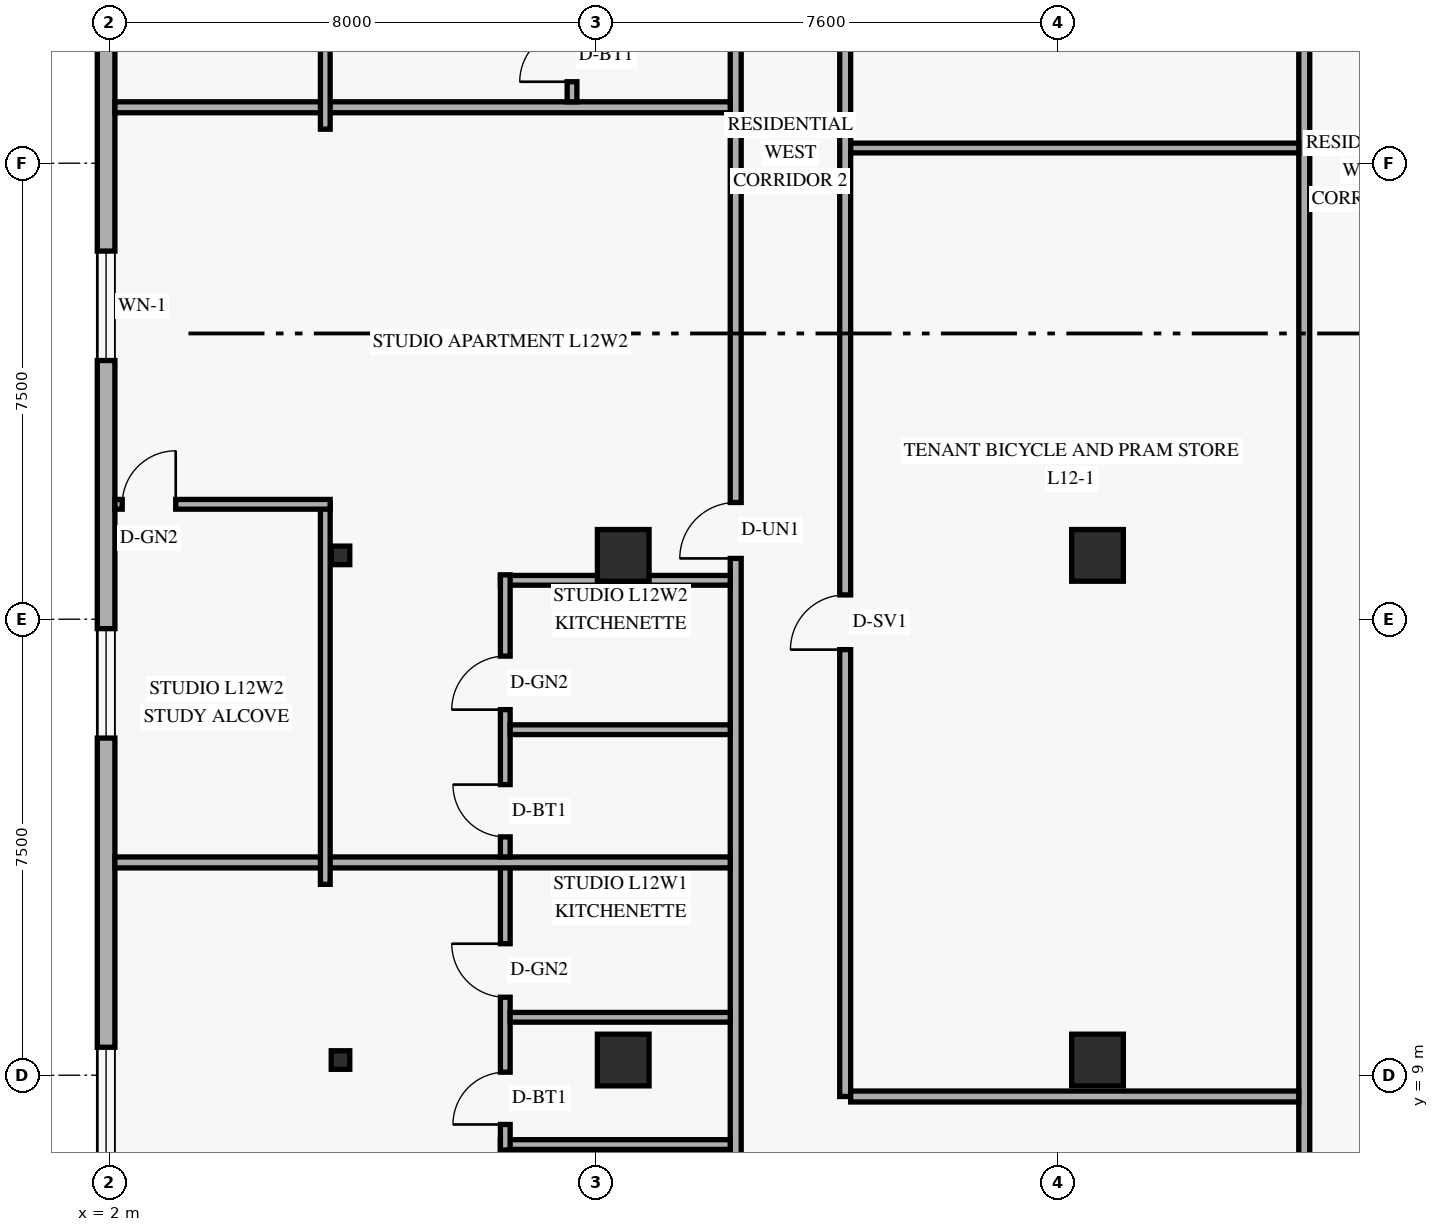
"""IFC4 building model, lengths in metres.
Left out: names, types, materials, properties, quantities, classifications, styles, units other than length and angle.
Written with IfcOpenShell. Run it as: python <this file> out.ifc"""

import sys

from ifc_helpers import new_model, si_unit, direction, frame, frame_2d, origin, origin_2d, place, context, subcontext, project, spatial, rectangle, hollow_rectangle, extrude, element, fill, save


model = new_model("IFC4")
c1 = context("Model", 3, precision=1e-05, world=origin(), true_north=direction((0.0, 1.0)))
c2 = subcontext(c1, "Body", "Model", "MODEL_VIEW")
j1 = project(units=[si_unit("LENGTHUNIT", "METRE"), si_unit("PLANEANGLEUNIT", "RADIAN")], contexts=[c1])
p1 = place(None, origin())
s1 = spatial("IfcSite", under=j1, at=p1, CompositionType="ELEMENT")
p2 = place(p1, origin())
s2 = spatial("IfcBuilding", under=s1, at=p2, CompositionType="ELEMENT")
p3 = place(p2, frame((0.0, 0.0, 49.2)))
s3 = spatial("IfcBuildingStorey", under=s2, at=p3, CompositionType="ELEMENT", Elevation=49.2)
for number, where, z_axis, x_axis in (
    (1, (5.8, 9.25, 0.0), (0.0, 0.0, 1.0), (1.0, 0.0, 0.0)),
    (2, (5.8, 17.55, 0.0), (0.0, 0.0, 1.0), (1.0, 0.0, 0.0)),
):
    element("IfcColumn", number, at=place(p3, frame(where, z_axis=z_axis, x_axis=x_axis)), inside=s3, PredefinedType="COLUMN", context=c2, shape_type="SweptSolid", body=[
        extrude(hollow_rectangle(XDim=0.305, YDim=0.305, WallThickness=0.013, at=origin_2d()), origin(), (0.0, 0.0, 1.0), 3.6),
    ])
for number, where, z_axis, x_axis in (
    (3, (10.45, 9.25, 0.0), (0.0, 0.0, 1.0), (1.0, 0.0, 0.0)),
    (4, (10.45, 17.55, 0.0), (0.0, 0.0, 1.0), (1.0, 0.0, 0.0)),
    (5, (18.25, 9.25, 0.0), (0.0, 0.0, 1.0), (1.0, 0.0, 0.0)),
    (6, (18.25, 17.55, 0.0), (0.0, 0.0, 1.0), (1.0, 0.0, 0.0)),
):
    element("IfcColumn", number, at=place(p3, frame(where, z_axis=z_axis, x_axis=x_axis)), inside=s3, PredefinedType="COLUMN", context=c2, shape_type="SweptSolid", body=[
        extrude(rectangle(XDim=0.85, YDim=0.85, at=origin_2d()), origin(), (0.0, 0.0, 1.0), 3.6),
    ])
p4 = place(p3, frame((1.945, 43.38, 0.0), z_axis=(0.0, 0.0, 1.0), x_axis=(0.0, -1.0, 0.0)))
e7 = element("IfcWall", 7, at=p4, inside=s3, PredefinedType="SOLIDWALL", context=c2, shape_type="SweptSolid", body=[
    extrude(rectangle(XDim=38.76, YDim=0.29, at=frame_2d((19.38, 0.0))), origin(), (0.0, 0.0, 1.0), 3.36),
])
p5 = place(p4, frame((33.92, 0.0, 0.85)))
e8 = element("IfcOpeningElement", 8, at=p5, cuts=e7, PredefinedType="OPENING", context=c2, shape_type="SweptSolid", body=[
    extrude(rectangle(XDim=1.8, YDim=1.6, at=frame_2d((0.9, 0.8))), frame((0.0, 0.155, 0.0), z_axis=(0.0, -1.0, 0.0), x_axis=(1.0, 0.0, 0.0)), (0.0, 0.0, 1.0), 0.31),
])
p6 = place(p4, frame((27.035, 0.0, 0.85)))
e9 = element("IfcOpeningElement", 9, at=p6, cuts=e7, PredefinedType="OPENING", context=c2, shape_type="SweptSolid", body=[
    extrude(rectangle(XDim=1.8, YDim=1.6, at=frame_2d((0.9, 0.8))), frame((0.0, 0.155, 0.0), z_axis=(0.0, -1.0, 0.0), x_axis=(1.0, 0.0, 0.0)), (0.0, 0.0, 1.0), 0.31),
])
p7 = place(p4, frame((20.825, 0.0, 0.85)))
e10 = element("IfcOpeningElement", 10, at=p7, cuts=e7, PredefinedType="OPENING", context=c2, shape_type="SweptSolid", body=[
    extrude(rectangle(XDim=1.8, YDim=1.6, at=frame_2d((0.9, 0.8))), frame((0.0, 0.155, 0.0), z_axis=(0.0, -1.0, 0.0), x_axis=(1.0, 0.0, 0.0)), (0.0, 0.0, 1.0), 0.31),
])
p8 = place(p4, frame((14.615, 0.0, 0.85)))
e11 = element("IfcOpeningElement", 11, at=p8, cuts=e7, PredefinedType="OPENING", context=c2, shape_type="SweptSolid", body=[
    extrude(rectangle(XDim=1.8, YDim=1.6, at=frame_2d((0.9, 0.8))), frame((0.0, 0.155, 0.0), z_axis=(0.0, -1.0, 0.0), x_axis=(1.0, 0.0, 0.0)), (0.0, 0.0, 1.0), 0.31),
])
p9 = place(p4, frame((8.635, 0.0, 0.85)))
e12 = element("IfcOpeningElement", 12, at=p9, cuts=e7, PredefinedType="OPENING", context=c2, shape_type="SweptSolid", body=[
    extrude(rectangle(XDim=1.8, YDim=1.6, at=frame_2d((0.9, 0.8))), frame((0.0, 0.155, 0.0), z_axis=(0.0, -1.0, 0.0), x_axis=(1.0, 0.0, 0.0)), (0.0, 0.0, 1.0), 0.31),
])
p10 = place(p4, frame((2.655, 0.0, 0.85)))
e13 = element("IfcOpeningElement", 13, at=p10, cuts=e7, PredefinedType="OPENING", context=c2, shape_type="SweptSolid", body=[
    extrude(rectangle(XDim=1.8, YDim=1.6, at=frame_2d((0.9, 0.8))), frame((0.0, 0.155, 0.0), z_axis=(0.0, -1.0, 0.0), x_axis=(1.0, 0.0, 0.0)), (0.0, 0.0, 1.0), 0.31),
])
p11 = place(p3, frame((21.65, 6.8, 0.0), z_axis=(0.0, 0.0, 1.0), x_axis=(0.0, 1.0, 0.0)))
e14 = element("IfcWall", 14, at=p11, inside=s3, PredefinedType="STANDARD", context=c2, shape_type="SweptSolid", body=[
    extrude(rectangle(XDim=34.4, YDim=0.18, at=frame_2d((17.2, 0.0))), origin(), (0.0, 0.0, 1.0), 2.649),
])
p12 = place(p3, frame((12.3, 1.29, 0.0), z_axis=(0.0, 0.0, 1.0), x_axis=(0.0, 1.0, 0.0)))
e15 = element("IfcWall", 15, at=p12, inside=s3, PredefinedType="STANDARD", context=c2, shape_type="SweptSolid", body=[
    extrude(rectangle(XDim=45.42, YDim=0.18, at=frame_2d((22.71, 0.0))), origin(), (0.0, 0.0, 1.0), 2.649),
])
p13 = place(p12, frame((5.27, 0.0, 0.0)))
e16 = element("IfcOpeningElement", 16, at=p13, cuts=e15, PredefinedType="OPENING", context=c2, shape_type="SweptSolid", body=[
    extrude(rectangle(XDim=0.92, YDim=2.15, at=frame_2d((0.46, 1.075))), frame((0.0, 0.1, 0.0), z_axis=(0.0, -1.0, 0.0), x_axis=(1.0, 0.0, 0.0)), (0.0, 0.0, 1.0), 0.2),
])
p14 = place(p12, frame((16.21, 0.0, 0.0)))
e17 = element("IfcOpeningElement", 17, at=p14, cuts=e15, PredefinedType="OPENING", context=c2, shape_type="SweptSolid", body=[
    extrude(rectangle(XDim=0.92, YDim=2.15, at=frame_2d((0.46, 1.075))), frame((0.0, 0.1, 0.0), z_axis=(0.0, -1.0, 0.0), x_axis=(1.0, 0.0, 0.0)), (0.0, 0.0, 1.0), 0.2),
])
p15 = place(p12, frame((28.63, 0.0, 0.0)))
e18 = element("IfcOpeningElement", 18, at=p15, cuts=e15, PredefinedType="OPENING", context=c2, shape_type="SweptSolid", body=[
    extrude(rectangle(XDim=0.92, YDim=2.15, at=frame_2d((0.46, 1.075))), frame((0.0, 0.1, 0.0), z_axis=(0.0, -1.0, 0.0), x_axis=(1.0, 0.0, 0.0)), (0.0, 0.0, 1.0), 0.2),
])
p16 = place(p12, frame((40.59, 0.0, 0.0)))
e19 = element("IfcOpeningElement", 19, at=p16, cuts=e15, PredefinedType="OPENING", context=c2, shape_type="SweptSolid", body=[
    extrude(rectangle(XDim=0.92, YDim=2.15, at=frame_2d((0.46, 1.075))), frame((0.0, 0.1, 0.0), z_axis=(0.0, -1.0, 0.0), x_axis=(1.0, 0.0, 0.0)), (0.0, 0.0, 1.0), 0.2),
])
p17 = place(p3, frame((14.1, 8.65, 0.0), z_axis=(0.0, 0.0, 1.0), x_axis=(0.0, 1.0, 0.0)))
e20 = element("IfcWall", 20, at=p17, inside=s3, PredefinedType="STANDARD", context=c2, shape_type="SweptSolid", body=[
    extrude(rectangle(XDim=30.7, YDim=0.18, at=frame_2d((15.35, 0.0))), origin(), (0.0, 0.0, 1.0), 2.649),
])
p18 = place(p17, frame((7.35, 0.0, 0.0)))
e21 = element("IfcOpeningElement", 21, at=p18, cuts=e20, PredefinedType="OPENING", context=c2, shape_type="SweptSolid", body=[
    extrude(rectangle(XDim=0.9, YDim=2.1, at=frame_2d((0.45, 1.05))), frame((0.0, 0.1, 0.0), z_axis=(0.0, -1.0, 0.0), x_axis=(1.0, 0.0, 0.0)), (0.0, 0.0, 1.0), 0.2),
])
p19 = place(p17, frame((22.7, 0.0, 0.0)))
e22 = element("IfcOpeningElement", 22, at=p19, cuts=e20, PredefinedType="OPENING", context=c2, shape_type="SweptSolid", body=[
    extrude(rectangle(XDim=0.95, YDim=2.15, at=frame_2d((0.475, 1.075))), frame((0.0, 0.1, 0.0), z_axis=(0.0, -1.0, 0.0), x_axis=(1.0, 0.0, 0.0)), (0.0, 0.0, 1.0), 0.2),
])
p20 = place(p3, frame((14.19, 8.65, 0.0), z_axis=(0.0, 0.0, 1.0), x_axis=(1.0, 0.0, 0.0)))
e23 = element("IfcWall", 23, at=p20, inside=s3, PredefinedType="STANDARD", context=c2, shape_type="SweptSolid", body=[
    extrude(rectangle(XDim=7.37, YDim=0.18, at=frame_2d((3.685, 0.0))), origin(), (0.0, 0.0, 1.0), 2.649),
])
p21 = place(p3, frame((8.43, 7.86, 0.0), z_axis=(0.0, 0.0, 1.0), x_axis=(1.0, 0.0, 0.0)))
e24 = element("IfcWall", 24, at=p21, inside=s3, PredefinedType="PLUMBINGWALL", context=c2, shape_type="SweptSolid", body=[
    extrude(rectangle(XDim=3.78, YDim=0.16, at=frame_2d((1.89, 0.0))), origin(), (0.0, 0.0, 1.0), 2.649),
])
p22 = place(p3, frame((8.51, 7.77, 0.0), z_axis=(0.0, 0.0, 1.0), x_axis=(0.0, 1.0, 0.0)))
e25 = element("IfcWall", 25, at=p22, inside=s3, PredefinedType="PLUMBINGWALL", context=c2, shape_type="SweptSolid", body=[
    extrude(rectangle(XDim=4.73, YDim=0.16, at=frame_2d((2.365, 0.0))), origin(), (0.0, 0.0, 1.0), 2.649),
])
p23 = place(p22, frame((0.42, 0.0, 0.0)))
e26 = element("IfcOpeningElement", 26, at=p23, cuts=e25, PredefinedType="OPENING", context=c2, shape_type="SweptSolid", body=[
    extrude(rectangle(XDim=0.86, YDim=2.12, at=frame_2d((0.43, 1.06))), frame((0.0, 0.09, 0.0), z_axis=(0.0, -1.0, 0.0), x_axis=(1.0, 0.0, 0.0)), (0.0, 0.0, 1.0), 0.18),
])
p24 = place(p22, frame((2.513, 0.0, 0.0)))
e27 = element("IfcOpeningElement", 27, at=p24, cuts=e25, PredefinedType="OPENING", context=c2, shape_type="SweptSolid", body=[
    extrude(rectangle(XDim=0.88, YDim=2.12, at=frame_2d((0.44, 1.06))), frame((0.0, 0.09, 0.0), z_axis=(0.0, -1.0, 0.0), x_axis=(1.0, 0.0, 0.0)), (0.0, 0.0, 1.0), 0.18),
])
p25 = place(p3, frame((8.59, 9.953, 0.0), z_axis=(0.0, 0.0, 1.0), x_axis=(1.0, 0.0, 0.0)))
e28 = element("IfcWall", 28, at=p25, inside=s3, PredefinedType="PLUMBINGWALL", context=c2, shape_type="SweptSolid", body=[
    extrude(rectangle(XDim=3.62, YDim=0.16, at=frame_2d((1.81, 0.0))), origin(), (0.0, 0.0, 1.0), 2.649),
])
p26 = place(p3, frame((2.09, 12.5, 0.0), z_axis=(0.0, 0.0, 1.0), x_axis=(1.0, 0.0, 0.0)))
e29 = element("IfcWall", 29, at=p26, inside=s3, PredefinedType="PARTITIONING", context=c2, shape_type="SweptSolid", body=[
    extrude(rectangle(XDim=10.12, YDim=0.18, at=frame_2d((5.06, 0.0))), origin(), (0.0, 0.0, 1.0), 2.649),
])
p27 = place(p3, frame((8.43, 17.14, 0.0), z_axis=(0.0, 0.0, 1.0), x_axis=(1.0, 0.0, 0.0)))
e30 = element("IfcWall", 30, at=p27, inside=s3, PredefinedType="PLUMBINGWALL", context=c2, shape_type="SweptSolid", body=[
    extrude(rectangle(XDim=3.78, YDim=0.16, at=frame_2d((1.89, 0.0))), origin(), (0.0, 0.0, 1.0), 2.649),
])
p28 = place(p3, frame((8.51, 12.59, 0.0), z_axis=(0.0, 0.0, 1.0), x_axis=(0.0, 1.0, 0.0)))
e31 = element("IfcWall", 31, at=p28, inside=s3, PredefinedType="PLUMBINGWALL", context=c2, shape_type="SweptSolid", body=[
    extrude(rectangle(XDim=4.64, YDim=0.16, at=frame_2d((2.32, 0.0))), origin(), (0.0, 0.0, 1.0), 2.932),
])
p29 = place(p28, frame((0.33, 0.0, 0.0)))
e32 = element("IfcOpeningElement", 32, at=p29, cuts=e31, PredefinedType="OPENING", context=c2, shape_type="SweptSolid", body=[
    extrude(rectangle(XDim=0.86, YDim=2.12, at=frame_2d((0.43, 1.06))), frame((0.0, 0.09, 0.0), z_axis=(0.0, -1.0, 0.0), x_axis=(1.0, 0.0, 0.0)), (0.0, 0.0, 1.0), 0.18),
])
p30 = place(p28, frame((2.423, 0.0, 0.0)))
e33 = element("IfcOpeningElement", 33, at=p30, cuts=e31, PredefinedType="OPENING", context=c2, shape_type="SweptSolid", body=[
    extrude(rectangle(XDim=0.88, YDim=2.12, at=frame_2d((0.44, 1.06))), frame((0.0, 0.09, 0.0), z_axis=(0.0, -1.0, 0.0), x_axis=(1.0, 0.0, 0.0)), (0.0, 0.0, 1.0), 0.18),
])
p31 = place(p3, frame((8.59, 14.683, 0.0), z_axis=(0.0, 0.0, 1.0), x_axis=(1.0, 0.0, 0.0)))
e34 = element("IfcWall", 34, at=p31, inside=s3, PredefinedType="PLUMBINGWALL", context=c2, shape_type="SweptSolid", body=[
    extrude(rectangle(XDim=3.62, YDim=0.16, at=frame_2d((1.81, 0.0))), origin(), (0.0, 0.0, 1.0), 2.649),
])
p32 = place(p3, frame((5.55, 12.14, 0.0), z_axis=(0.0, 0.0, 1.0), x_axis=(0.0, 1.0, 0.0)))
e35 = element("IfcWall", 35, at=p32, inside=s3, PredefinedType="PARTITIONING", context=c2, shape_type="SweptSolid", body=[
    extrude(rectangle(XDim=6.25, YDim=0.16, at=frame_2d((3.125, 0.0))), origin(), (0.0, 0.0, 1.0), 3.36),
])
p33 = place(p3, frame((2.09, 18.39, 0.0), z_axis=(0.0, 0.0, 1.0), x_axis=(1.0, 0.0, 0.0)))
e36 = element("IfcWall", 36, at=p33, inside=s3, PredefinedType="PARTITIONING", context=c2, shape_type="SweptSolid", body=[
    extrude(rectangle(XDim=3.54, YDim=0.16, at=frame_2d((1.77, 0.0))), origin(), (0.0, 0.0, 1.0), 3.36),
])
p34 = place(p33, frame((0.12, 0.0, 0.0)))
e37 = element("IfcOpeningElement", 37, at=p34, cuts=e36, PredefinedType="OPENING", context=c2, shape_type="SweptSolid", body=[
    extrude(rectangle(XDim=0.88, YDim=2.12, at=frame_2d((0.44, 1.06))), frame((0.0, 0.09, 0.0), z_axis=(0.0, -1.0, 0.0), x_axis=(1.0, 0.0, 0.0)), (0.0, 0.0, 1.0), 0.18),
])
p35 = place(p3, frame((2.09, 24.92, 0.0), z_axis=(0.0, 0.0, 1.0), x_axis=(1.0, 0.0, 0.0)))
e38 = element("IfcWall", 38, at=p35, inside=s3, PredefinedType="PARTITIONING", context=c2, shape_type="SweptSolid", body=[
    extrude(rectangle(XDim=10.12, YDim=0.18, at=frame_2d((5.06, 0.0))), origin(), (0.0, 0.0, 1.0), 2.649),
])
p36 = place(p3, frame((9.608, 25.01, 0.0), z_axis=(0.0, 0.0, 1.0), x_axis=(0.0, 1.0, 0.0)))
e39 = element("IfcWall", 39, at=p36, inside=s3, PredefinedType="PLUMBINGWALL", context=c2, shape_type="SweptSolid", body=[
    extrude(rectangle(XDim=4.64, YDim=0.16, at=frame_2d((2.32, 0.0))), origin(), (0.0, 0.0, 1.0), 3.36),
])
p37 = place(p36, frame((0.33, 0.0, 0.0)))
e40 = element("IfcOpeningElement", 40, at=p37, cuts=e39, PredefinedType="OPENING", context=c2, shape_type="SweptSolid", body=[
    extrude(rectangle(XDim=0.86, YDim=2.12, at=frame_2d((0.43, 1.06))), frame((0.0, 0.09, 0.0), z_axis=(0.0, -1.0, 0.0), x_axis=(1.0, 0.0, 0.0)), (0.0, 0.0, 1.0), 0.18),
])
p38 = place(p36, frame((2.423, 0.0, 0.0)))
e41 = element("IfcOpeningElement", 41, at=p38, cuts=e39, PredefinedType="OPENING", context=c2, shape_type="SweptSolid", body=[
    extrude(rectangle(XDim=0.88, YDim=2.12, at=frame_2d((0.44, 1.06))), frame((0.0, 0.09, 0.0), z_axis=(0.0, -1.0, 0.0), x_axis=(1.0, 0.0, 0.0)), (0.0, 0.0, 1.0), 0.18),
])
p39 = place(p3, frame((5.55, 24.56, 0.0), z_axis=(0.0, 0.0, 1.0), x_axis=(0.0, 1.0, 0.0)))
e42 = element("IfcWall", 42, at=p39, inside=s3, PredefinedType="PARTITIONING", context=c2, shape_type="SweptSolid", body=[
    extrude(rectangle(XDim=6.25, YDim=0.16, at=frame_2d((3.125, 0.0))), origin(), (0.0, 0.0, 1.0), 3.36),
])
p40 = place(p3, frame((14.19, 24.25, 0.0), z_axis=(0.0, 0.0, 1.0), x_axis=(1.0, 0.0, 0.0)))
e43 = element("IfcWall", 43, at=p40, inside=s3, PredefinedType="PARTITIONING", context=c2, shape_type="SweptSolid", body=[
    extrude(rectangle(XDim=7.37, YDim=0.16, at=frame_2d((3.685, 0.0))), origin(), (0.0, 0.0, 1.0), 2.649),
])
p41 = place(p5, origin())
e44 = element("IfcWindow", 44, at=p41, inside=s3, PartitioningType="SINGLE_PANEL", PredefinedType="WINDOW", context=c2, shape_type="SweptSolid", body=[
    extrude(rectangle(XDim=1.8, YDim=1.6, at=frame_2d((0.9, 0.8))), frame((0.0, 0.03, 0.0), z_axis=(0.0, -1.0, 0.0), x_axis=(1.0, 0.0, 0.0)), (0.0, 0.0, 1.0), 0.06),
])
fill(e8, e44)
p42 = place(p6, origin())
e45 = element("IfcWindow", 45, at=p42, inside=s3, PartitioningType="SINGLE_PANEL", PredefinedType="WINDOW", context=c2, shape_type="SweptSolid", body=[
    extrude(rectangle(XDim=1.8, YDim=1.6, at=frame_2d((0.9, 0.8))), frame((0.0, 0.03, 0.0), z_axis=(0.0, -1.0, 0.0), x_axis=(1.0, 0.0, 0.0)), (0.0, 0.0, 1.0), 0.06),
])
fill(e9, e45)
p43 = place(p7, origin())
e46 = element("IfcWindow", 46, at=p43, inside=s3, PartitioningType="SINGLE_PANEL", PredefinedType="WINDOW", context=c2, shape_type="SweptSolid", body=[
    extrude(rectangle(XDim=1.8, YDim=1.6, at=frame_2d((0.9, 0.8))), frame((0.0, 0.03, 0.0), z_axis=(0.0, -1.0, 0.0), x_axis=(1.0, 0.0, 0.0)), (0.0, 0.0, 1.0), 0.06),
])
fill(e10, e46)
p44 = place(p23, origin())
e47 = element("IfcDoor", 47, at=p44, inside=s3, OperationType="SINGLE_SWING_LEFT", PredefinedType="DOOR", context=c2, shape_type="SweptSolid", body=[
    extrude(rectangle(XDim=0.86, YDim=2.12, at=frame_2d((0.43, 1.06))), frame((0.0, 0.025, 0.0), z_axis=(0.0, -1.0, 0.0), x_axis=(1.0, 0.0, 0.0)), (0.0, 0.0, 1.0), 0.05),
])
fill(e26, e47)
p45 = place(p24, origin())
e48 = element("IfcDoor", 48, at=p45, inside=s3, OperationType="SINGLE_SWING_RIGHT", PredefinedType="DOOR", context=c2, shape_type="SweptSolid", body=[
    extrude(rectangle(XDim=0.88, YDim=2.12, at=frame_2d((0.44, 1.06))), frame((0.0, 0.025, 0.0), z_axis=(0.0, -1.0, 0.0), x_axis=(1.0, 0.0, 0.0)), (0.0, 0.0, 1.0), 0.05),
])
fill(e27, e48)
p46 = place(p34, origin())
e49 = element("IfcDoor", 49, at=p46, inside=s3, OperationType="SINGLE_SWING_RIGHT", PredefinedType="DOOR", context=c2, shape_type="SweptSolid", body=[
    extrude(rectangle(XDim=0.88, YDim=2.12, at=frame_2d((0.44, 1.06))), frame((0.0, 0.025, 0.0), z_axis=(0.0, -1.0, 0.0), x_axis=(1.0, 0.0, 0.0)), (0.0, 0.0, 1.0), 0.05),
])
fill(e37, e49)
p47 = place(p14, origin())
e50 = element("IfcDoor", 50, at=p47, inside=s3, OperationType="SINGLE_SWING_LEFT", PredefinedType="DOOR", context=c2, shape_type="SweptSolid", body=[
    extrude(rectangle(XDim=0.92, YDim=2.15, at=frame_2d((0.46, 1.075))), frame((0.0, 0.025, 0.0), z_axis=(0.0, -1.0, 0.0), x_axis=(1.0, 0.0, 0.0)), (0.0, 0.0, 1.0), 0.05),
])
fill(e17, e50)
p48 = place(p29, origin())
e51 = element("IfcDoor", 51, at=p48, inside=s3, OperationType="SINGLE_SWING_RIGHT", PredefinedType="DOOR", context=c2, shape_type="SweptSolid", body=[
    extrude(rectangle(XDim=0.86, YDim=2.12, at=frame_2d((0.43, 1.06))), frame((0.0, 0.025, 0.0), z_axis=(0.0, -1.0, 0.0), x_axis=(1.0, 0.0, 0.0)), (0.0, 0.0, 1.0), 0.05),
])
fill(e32, e51)
p49 = place(p30, origin())
e52 = element("IfcDoor", 52, at=p49, inside=s3, OperationType="SINGLE_SWING_LEFT", PredefinedType="DOOR", context=c2, shape_type="SweptSolid", body=[
    extrude(rectangle(XDim=0.88, YDim=2.12, at=frame_2d((0.44, 1.06))), frame((0.0, 0.025, 0.0), z_axis=(0.0, -1.0, 0.0), x_axis=(1.0, 0.0, 0.0)), (0.0, 0.0, 1.0), 0.05),
])
fill(e33, e52)
p50 = place(p37, origin())
e53 = element("IfcDoor", 53, at=p50, inside=s3, OperationType="SINGLE_SWING_LEFT", PredefinedType="DOOR", context=c2, shape_type="SweptSolid", body=[
    extrude(rectangle(XDim=0.86, YDim=2.12, at=frame_2d((0.43, 1.06))), frame((0.0, 0.025, 0.0), z_axis=(0.0, -1.0, 0.0), x_axis=(1.0, 0.0, 0.0)), (0.0, 0.0, 1.0), 0.05),
])
fill(e40, e53)
p51 = place(p18, origin())
e54 = element("IfcDoor", 54, at=p51, inside=s3, OperationType="SINGLE_SWING_LEFT", PredefinedType="DOOR", context=c2, shape_type="SweptSolid", body=[
    extrude(rectangle(XDim=0.9, YDim=2.1, at=frame_2d((0.45, 1.05))), frame((0.0, 0.025, 0.0), z_axis=(0.0, -1.0, 0.0), x_axis=(1.0, 0.0, 0.0)), (0.0, 0.0, 1.0), 0.05),
])
fill(e21, e54)
save(model, sys.argv[1])
